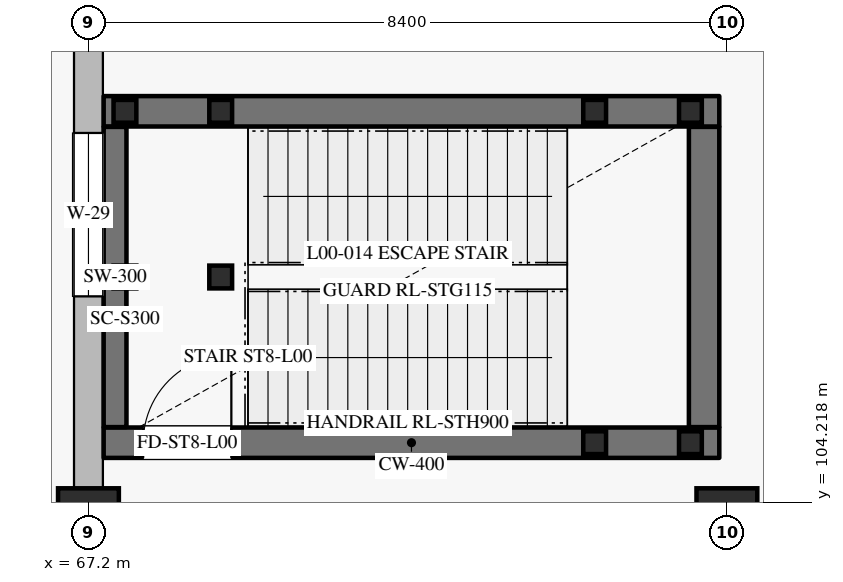
"""IFC4 building model, lengths in metres.
Left out: names, types, materials, properties, quantities, classifications, styles, units other than length and angle.
Written with IfcOpenShell. Run it as: python <this file> out.ifc"""

import sys

from ifc_helpers import new_model, si_unit, direction, frame, frame_2d, origin, origin_2d, place, context, subcontext, project, spatial, rectangle, hollow_rectangle, extrude, element, fill, save


model = new_model("IFC4")
c1 = context("Model", 3, precision=1e-05, world=origin(), true_north=direction((0.0, 1.0)))
c2 = subcontext(c1, "Body", "Model", "MODEL_VIEW")
j1 = project(units=[si_unit("LENGTHUNIT", "METRE"), si_unit("PLANEANGLEUNIT", "RADIAN")], contexts=[c1])
p1 = place(None, origin())
s1 = spatial("IfcSite", under=j1, at=p1, CompositionType="ELEMENT")
p2 = place(p1, origin())
s2 = spatial("IfcBuilding", under=s1, at=p2, CompositionType="ELEMENT")
p3 = place(p2, origin())
s3 = spatial("IfcBuildingStorey", under=s2, at=p3, CompositionType="ELEMENT", Elevation=0.0)
for number, where, z_axis, x_axis in (
    (1, (67.2, 104.0, 0.0), (0.0, 0.0, 1.0), (1.0, 0.0, 0.0)),
    (2, (75.6, 104.0, 0.0), (0.0, 0.0, 1.0), (1.0, 0.0, 0.0)),
):
    element("IfcColumn", number, at=place(p3, frame(where, z_axis=z_axis, x_axis=x_axis)), inside=s3, PredefinedType="COLUMN", context=c2, shape_type="SweptSolid", body=[
        extrude(rectangle(XDim=0.8, YDim=0.8, at=origin_2d()), origin(), (0.0, 0.0, 1.0), 6.0),
    ])
p4 = place(p3, frame((67.2, 104.4, 0.0), z_axis=(0.0, 0.0, 1.0), x_axis=(0.0, 1.0, 0.0)))
e3 = element("IfcWall", 3, at=p4, inside=s3, PredefinedType="SOLIDWALL", context=c2, shape_type="SweptSolid", body=[
    extrude(rectangle(XDim=7.2, YDim=0.38, at=frame_2d((3.6, 0.0))), origin(), (0.0, 0.0, 1.0), 5.7),
])
p5 = place(p4, frame((2.525, 0.0, 1.05)))
e4 = element("IfcOpeningElement", 4, at=p5, cuts=e3, PredefinedType="OPENING", context=c2, shape_type="SweptSolid", body=[
    extrude(rectangle(XDim=2.15, YDim=2.1, at=frame_2d((1.075, 1.05))), frame((0.0, 0.2, 0.0), z_axis=(0.0, -1.0, 0.0), x_axis=(1.0, 0.0, 0.0)), (0.0, 0.0, 1.0), 0.4),
])
p6 = place(p3, frame((67.4, 105.0, 0.0), z_axis=(0.0, 0.0, 1.0), x_axis=(1.0, 0.0, 0.0)))
e5 = element("IfcWall", 5, at=p6, inside=s3, PredefinedType="SHEAR", context=c2, shape_type="SweptSolid", body=[
    extrude(rectangle(XDim=8.1, YDim=0.4, at=frame_2d((4.05, 0.0))), origin(), (0.0, 0.0, 1.0), 5.675),
])
p7 = place(p6, frame((0.52, 0.0, 0.0)))
e6 = element("IfcOpeningElement", 6, at=p7, cuts=e5, PredefinedType="OPENING", context=c2, shape_type="SweptSolid", body=[
    extrude(rectangle(XDim=1.16, YDim=2.2, at=frame_2d((0.58, 1.1))), frame((0.0, 0.21, 0.0), z_axis=(0.0, -1.0, 0.0), x_axis=(1.0, 0.0, 0.0)), (0.0, 0.0, 1.0), 0.42),
])
p8 = place(p3, frame((75.3, 105.205, 0.0), z_axis=(0.0, 0.0, 1.0), x_axis=(0.0, 1.0, 0.0)))
e7 = element("IfcWall", 7, at=p8, inside=s3, PredefinedType="SHEAR", context=c2, shape_type="SweptSolid", body=[
    extrude(rectangle(XDim=3.95, YDim=0.4, at=frame_2d((1.975, 0.0))), origin(), (0.0, 0.0, 1.0), 5.675),
])
p9 = place(p3, frame((67.4, 109.36, 0.0), z_axis=(0.0, 0.0, 1.0), x_axis=(1.0, 0.0, 0.0)))
e8 = element("IfcWall", 8, at=p9, inside=s3, PredefinedType="SHEAR", context=c2, shape_type="SweptSolid", body=[
    extrude(rectangle(XDim=8.1, YDim=0.4, at=frame_2d((4.05, 0.0))), origin(), (0.0, 0.0, 1.0), 5.675),
])
p10 = place(p3, frame((67.55, 105.205, 0.0), z_axis=(0.0, 0.0, 1.0), x_axis=(0.0, 1.0, 0.0)))
e9 = element("IfcWall", 9, at=p10, inside=s3, PredefinedType="SHEAR", context=c2, shape_type="SweptSolid", body=[
    extrude(rectangle(XDim=3.95, YDim=0.3, at=frame_2d((1.975, 0.0))), origin(), (0.0, 0.0, 1.0), 5.675),
])
for number, where, z_axis, x_axis in (
    (10, (67.68, 107.18, 0.0), (0.0, 0.0, 1.0), (1.0, 0.0, 0.0)),
    (11, (67.68, 109.36, 0.0), (0.0, 0.0, 1.0), (1.0, 0.0, 0.0)),
    (12, (68.94, 107.18, 0.0), (0.0, 0.0, 1.0), (1.0, 0.0, 0.0)),
    (13, (68.94, 109.36, 0.0), (0.0, 0.0, 1.0), (1.0, 0.0, 0.0)),
):
    element("IfcColumn", number, at=place(p3, frame(where, z_axis=z_axis, x_axis=x_axis)), inside=s3, PredefinedType="COLUMN", context=c2, shape_type="SweptSolid", body=[
        extrude(hollow_rectangle(XDim=0.3, YDim=0.3, WallThickness=0.012, at=origin_2d()), origin(), (0.0, 0.0, 1.0), 5.82),
    ])
for number, where, z_axis, x_axis in (
    (14, (73.86, 105.0, -2.7), (0.0, 0.0, 1.0), (1.0, 0.0, 0.0)),
    (15, (73.86, 109.36, -2.7), (0.0, 0.0, 1.0), (1.0, 0.0, 0.0)),
    (16, (75.12, 105.0, -2.7), (0.0, 0.0, 1.0), (1.0, 0.0, 0.0)),
    (17, (75.12, 109.36, -2.7), (0.0, 0.0, 1.0), (1.0, 0.0, 0.0)),
):
    element("IfcColumn", number, at=place(p3, frame(where, z_axis=z_axis, x_axis=x_axis)), inside=s3, PredefinedType="COLUMN", context=c2, shape_type="SweptSolid", body=[
        extrude(hollow_rectangle(XDim=0.3, YDim=0.3, WallThickness=0.012, at=origin_2d()), origin(), (0.0, 0.0, 1.0), 5.52),
    ])
p11 = place(p5, origin())
e18 = element("IfcWindow", 18, at=p11, inside=s3, PartitioningType="DOUBLE_PANEL_VERTICAL", PredefinedType="WINDOW", context=c2, shape_type="SweptSolid", body=[
    extrude(rectangle(XDim=2.15, YDim=2.1, at=frame_2d((1.075, 1.05))), frame((0.0, 0.03, 0.0), z_axis=(0.0, -1.0, 0.0), x_axis=(1.0, 0.0, 0.0)), (0.0, 0.0, 1.0), 0.06),
])
fill(e4, e18)
p12 = place(p7, origin())
e19 = element("IfcDoor", 19, at=p12, inside=s3, OperationType="SINGLE_SWING_RIGHT", PredefinedType="DOOR", context=c2, shape_type="SweptSolid", body=[
    extrude(rectangle(XDim=1.16, YDim=2.2, at=frame_2d((0.58, 1.1))), frame((0.0, 0.025, 0.0), z_axis=(0.0, -1.0, 0.0), x_axis=(1.0, 0.0, 0.0)), (0.0, 0.0, 1.0), 0.05),
])
fill(e6, e19)
save(model, sys.argv[1])
